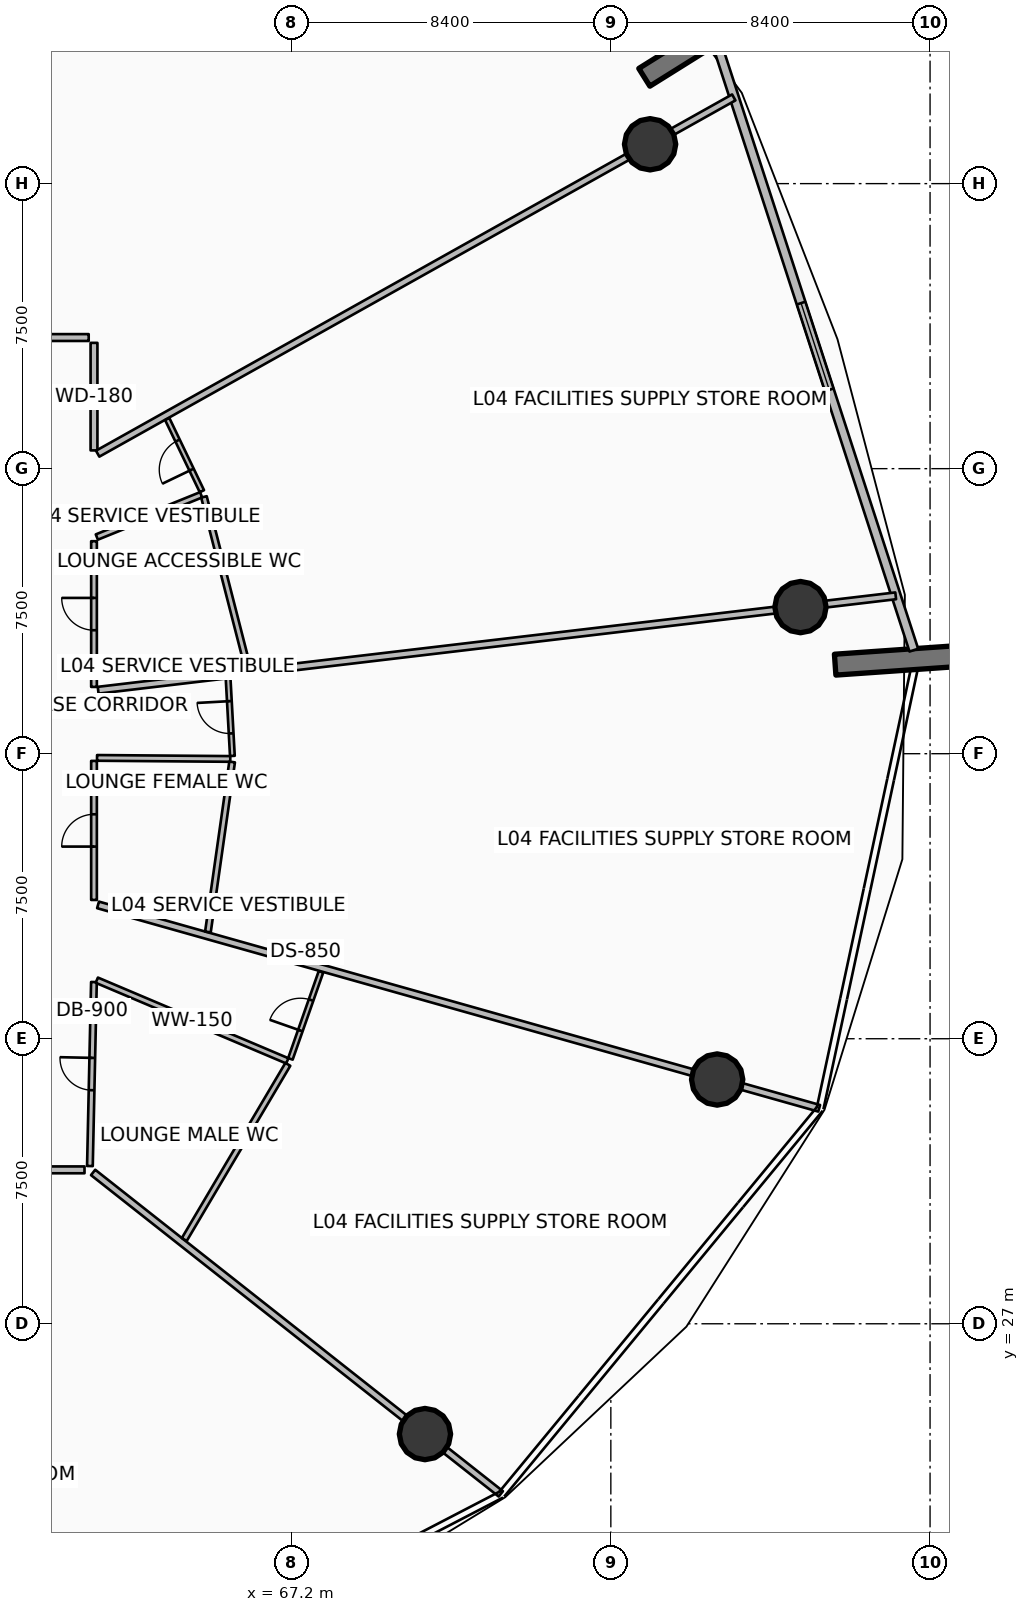
"""IFC4 building model, lengths in metres.
Left out: names, types, materials, properties, quantities, classifications, styles, units other than length and angle.
Written with IfcOpenShell. Run it as: python <this file> out.ifc"""

import sys

from ifc_helpers import new_model, si_unit, direction, frame, frame_2d, origin, origin_2d, place, context, subcontext, project, spatial, rectangle, circle, extrude, element, fill, save


model = new_model("IFC4")
c1 = context("Model", 3, precision=1e-05, world=origin(), true_north=direction((0.0, 1.0)))
c2 = subcontext(c1, "Body", "Model", "MODEL_VIEW")
j1 = project(units=[si_unit("LENGTHUNIT", "METRE"), si_unit("PLANEANGLEUNIT", "RADIAN")], contexts=[c1])
p1 = place(None, origin())
s1 = spatial("IfcSite", under=j1, at=p1, CompositionType="ELEMENT")
p2 = place(p1, origin())
s2 = spatial("IfcBuilding", under=s1, at=p2, CompositionType="ELEMENT")
p3 = place(p2, frame((0.0, 0.0, 21.6)))
s3 = spatial("IfcBuildingStorey", under=s2, at=p3, CompositionType="ELEMENT", Elevation=21.6)
for number, where, z_axis, x_axis in (
    (1, (76.481, 59.797, 0.0), (0.0, 0.0, 1.0), (0.848, 0.53, 0.0)),
    (2, (81.503, 44.343, 0.0), (0.0, 0.0, 1.0), (0.998, 0.07, 0.0)),
):
    element("IfcWall", number, at=place(p3, frame(where, z_axis=z_axis, x_axis=x_axis)), inside=s3, PredefinedType="SOLIDWALL", context=c2, shape_type="SweptSolid", body=[
        extrude(rectangle(XDim=3.5, YDim=0.55, at=frame_2d((1.75, 0.0))), origin(), (0.0, 0.0, 1.0), 4.8),
    ])
p4 = place(p3, frame((76.633, 58.035, 0.0), z_axis=(-0.515579191141, -0.288765528915, 0.806717154257), x_axis=(0.488656419967, -0.872476305251, 0.0)))
e3 = element("IfcColumn", 3, at=p4, inside=s3, PredefinedType="COLUMN", context=c2, shape_type="SweptSolid", body=[
    extrude(circle(Radius=0.675, at=origin_2d()), origin(), (0.0, 0.0, 1.0), 5.454),
])
p5 = place(p3, frame((60.889, 18.984, 0.0), z_axis=(-0.247961982584, 0.442707288227, 0.861698968401), x_axis=(-0.872467449304, -0.488672231568, 0.0)))
e4 = element("IfcColumn", 4, at=p5, inside=s3, PredefinedType="COLUMN", context=c2, shape_type="SweptSolid", body=[
    extrude(circle(Radius=0.675, at=origin_2d()), origin(), (0.0, 0.0, 1.0), 5.106),
])
p6 = place(p3, frame((70.709, 24.098, 0.0), z_axis=(-0.425909043598, 0.335748350699, 0.840163395766), x_axis=(-0.619081137709, -0.785327030563, 0.0)))
e5 = element("IfcColumn", 5, at=p6, inside=s3, PredefinedType="COLUMN", context=c2, shape_type="SweptSolid", body=[
    extrude(circle(Radius=0.675, at=origin_2d()), origin(), (0.0, 0.0, 1.0), 5.237),
])
p7 = place(p3, frame((78.398, 33.427, 0.0), z_axis=(-0.554552366056, 0.156415694351, 0.817316220237), x_axis=(-0.271465773361, -0.96244809413, 0.0)))
e6 = element("IfcColumn", 6, at=p7, inside=s3, PredefinedType="COLUMN", context=c2, shape_type="SweptSolid", body=[
    extrude(circle(Radius=0.675, at=origin_2d()), origin(), (0.0, 0.0, 1.0), 5.383),
])
p8 = place(p3, frame((80.59, 45.857, 0.0), z_axis=(-0.586842932978, -0.069427413352, 0.806718790093), x_axis=(0.117487290092, -0.993074386271, 0.0)))
e7 = element("IfcColumn", 7, at=p8, inside=s3, PredefinedType="COLUMN", context=c2, shape_type="SweptSolid", body=[
    extrude(circle(Radius=0.675, at=origin_2d()), origin(), (0.0, 0.0, 1.0), 5.454),
])
p9 = place(p3, frame((83.573, 44.725, 0.0), z_axis=(0.0, 0.0, 1.0), x_axis=(-0.309022005354, 0.951054888115, 0.0)))
e8 = element("IfcWall", 8, at=p9, inside=s3, PredefinedType="SOLIDWALL", context=c2, shape_type="SweptSolid", body=[
    extrude(rectangle(XDim=16.803, YDim=0.24, at=frame_2d((8.401, 0.0))), origin(), (0.0, 0.0, 1.0), 3.35),
])
p10 = place(p9, frame((7.201, 0.0, 0.85)))
e9 = element("IfcOpeningElement", 9, at=p10, cuts=e8, PredefinedType="OPENING", context=c2, shape_type="SweptSolid", body=[
    extrude(rectangle(XDim=2.4, YDim=2.1, at=frame_2d((1.2, 1.05))), frame((0.0, 0.13, 0.0), z_axis=(0.0, -1.0, 0.0), x_axis=(1.0, 0.0, 0.0)), (0.0, 0.0, 1.0), 0.26),
])
p11 = place(p3, frame((62.0, 49.98, 0.0), z_axis=(0.0, 0.0, 1.0), x_axis=(0.0, 1.0, 0.0)))
e10 = element("IfcWall", 10, at=p11, inside=s3, PredefinedType="PARTITIONING", context=c2, shape_type="SweptSolid", body=[
    extrude(rectangle(XDim=2.83, YDim=0.18, at=frame_2d((1.415, 0.0))), origin(), (0.0, 0.0, 1.0), 3.357),
])
p12 = place(p3, frame((61.86, 52.95, 0.0), z_axis=(0.0, 0.0, 1.0), x_axis=(-1.0, 0.0, 0.0)))
e11 = element("IfcWall", 11, at=p12, inside=s3, PredefinedType="PARTITIONING", context=c2, shape_type="SweptSolid", body=[
    extrude(rectangle(XDim=5.088, YDim=0.18, at=frame_2d((2.544, 0.0))), origin(), (0.0, 0.0, 1.0), 3.357),
])
p13 = place(p3, frame((62.096, 49.894, 0.0), z_axis=(0.0, 0.0, 1.0), x_axis=(0.872490608205, 0.488630881744, 0.0)))
e12 = element("IfcWall", 12, at=p13, inside=s3, PredefinedType="PARTITIONING", context=c2, shape_type="SweptSolid", body=[
    extrude(rectangle(XDim=19.185, YDim=0.18, at=frame_2d((9.592, 0.0))), origin(), (0.0, 0.0, 1.0), 3.357),
])
p14 = place(p3, frame((54.272, 31.05, 0.0), z_axis=(0.0, 0.0, 1.0), x_axis=(1.0, 0.0, 0.0)))
e13 = element("IfcWall", 13, at=p14, inside=s3, PredefinedType="PARTITIONING", context=c2, shape_type="SweptSolid", body=[
    extrude(rectangle(XDim=7.478, YDim=0.18, at=frame_2d((3.739, 0.0))), origin(), (0.0, 0.0, 1.0), 3.357),
])
p15 = place(p14, frame((3.214, 0.0, 0.0)))
e14 = element("IfcOpeningElement", 14, at=p15, cuts=e13, PredefinedType="OPENING", context=c2, shape_type="SweptSolid", body=[
    extrude(rectangle(XDim=1.05, YDim=2.1, at=frame_2d((0.525, 1.05))), frame((0.0, 0.1, 0.0), z_axis=(0.0, -1.0, 0.0), x_axis=(1.0, 0.0, 0.0)), (0.0, 0.0, 1.0), 0.2),
])
p16 = place(p3, frame((61.976, 30.982, 0.0), z_axis=(0.0, 0.0, 1.0), x_axis=(0.785315783489, -0.619095404766, 0.0)))
e15 = element("IfcWall", 15, at=p16, inside=s3, PredefinedType="PARTITIONING", context=c2, shape_type="SweptSolid", body=[
    extrude(rectangle(XDim=13.661, YDim=0.18, at=frame_2d((6.831, 0.0))), origin(), (0.0, 0.0, 1.0), 3.357),
])
p17 = place(p3, frame((61.892, 31.15, 0.0), z_axis=(0.0, 0.0, 1.0), x_axis=(0.021928973177, 0.999759531155, 0.0)))
e16 = element("IfcWall", 16, at=p17, inside=s3, PredefinedType="PARTITIONING", context=c2, shape_type="SweptSolid", body=[
    extrude(rectangle(XDim=4.843, YDim=0.15, at=frame_2d((2.421, 0.0))), origin(), (0.0, 0.0, 1.0), 3.357),
])
p18 = place(p17, frame((1.997, 0.0, 0.0)))
e17 = element("IfcOpeningElement", 17, at=p18, cuts=e16, PredefinedType="OPENING", context=c2, shape_type="SweptSolid", body=[
    extrude(rectangle(XDim=0.85, YDim=2.06, at=frame_2d((0.425, 1.03))), frame((0.0, 0.085, 0.0), z_axis=(0.0, -1.0, 0.0), x_axis=(1.0, 0.0, 0.0)), (0.0, 0.0, 1.0), 0.17),
])
p19 = place(p3, frame((62.074, 36.041, 0.0), z_axis=(0.0, 0.0, 1.0), x_axis=(0.920841540816, -0.38993699069, 0.0)))
e18 = element("IfcWall", 18, at=p19, inside=s3, PredefinedType="PARTITIONING", context=c2, shape_type="SweptSolid", body=[
    extrude(rectangle(XDim=5.443, YDim=0.15, at=frame_2d((2.722, 0.0))), origin(), (0.0, 0.0, 1.0), 3.84),
])
p20 = place(p3, frame((64.375, 29.217, 0.0), z_axis=(0.0, 0.0, 1.0), x_axis=(0.509047270842, 0.860738564286, 0.0)))
e19 = element("IfcWall", 19, at=p20, inside=s3, PredefinedType="PARTITIONING", context=c2, shape_type="SweptSolid", body=[
    extrude(rectangle(XDim=5.354, YDim=0.15, at=frame_2d((2.677, 0.0))), origin(), (0.0, 0.0, 1.0), 3.357),
])
p21 = place(p3, frame((67.168, 33.97, 0.0), z_axis=(0.0, 0.0, 1.0), x_axis=(0.331316814656, 0.943519564358, 0.0)))
e20 = element("IfcWall", 20, at=p21, inside=s3, PredefinedType="PARTITIONING", context=c2, shape_type="SweptSolid", body=[
    extrude(rectangle(XDim=2.43, YDim=0.125, at=frame_2d((1.215, 0.0))), origin(), (0.0, 0.0, 1.0), 3.357),
])
p22 = place(p21, frame((0.79, 0.0, 0.0)))
e21 = element("IfcOpeningElement", 21, at=p22, cuts=e20, PredefinedType="OPENING", context=c2, shape_type="SweptSolid", body=[
    extrude(rectangle(XDim=0.85, YDim=2.06, at=frame_2d((0.425, 1.03))), frame((0.0, 0.073, 0.0), z_axis=(0.0, -1.0, 0.0), x_axis=(1.0, 0.0, 0.0)), (0.0, 0.0, 1.0), 0.145),
])
p23 = place(p3, frame((62.106, 38.022, 0.0), z_axis=(0.0, 0.0, 1.0), x_axis=(0.962455233657, -0.271440459782, 0.0)))
e22 = element("IfcWall", 22, at=p23, inside=s3, PredefinedType="PARTITIONING", context=c2, shape_type="SweptSolid", body=[
    extrude(rectangle(XDim=19.716, YDim=0.18, at=frame_2d((9.858, 0.0))), origin(), (0.0, 0.0, 1.0), 3.357),
])
p24 = place(p3, frame((62.0, 38.152, 0.0), z_axis=(0.0, 0.0, 1.0), x_axis=(0.0, 1.0, 0.0)))
e23 = element("IfcWall", 23, at=p24, inside=s3, PredefinedType="PARTITIONING", context=c2, shape_type="SweptSolid", body=[
    extrude(rectangle(XDim=3.658, YDim=0.15, at=frame_2d((1.829, 0.0))), origin(), (0.0, 0.0, 1.0), 3.357),
])
p25 = place(p24, frame((1.404, 0.0, 0.0)))
e24 = element("IfcOpeningElement", 24, at=p25, cuts=e23, PredefinedType="OPENING", context=c2, shape_type="SweptSolid", body=[
    extrude(rectangle(XDim=0.85, YDim=2.06, at=frame_2d((0.425, 1.03))), frame((0.0, 0.085, 0.0), z_axis=(0.0, -1.0, 0.0), x_axis=(1.0, 0.0, 0.0)), (0.0, 0.0, 1.0), 0.17),
])
p26 = place(p3, frame((62.08, 41.889, 0.0), z_axis=(0.0, 0.0, 1.0), x_axis=(0.999969031596, -0.007869933178, 0.0)))
e25 = element("IfcWall", 25, at=p26, inside=s3, PredefinedType="PARTITIONING", context=c2, shape_type="SweptSolid", body=[
    extrude(rectangle(XDim=3.505, YDim=0.15, at=frame_2d((1.753, 0.0))), origin(), (0.0, 0.0, 1.0), 3.84),
])
p27 = place(p3, frame((64.998, 37.309, 0.0), z_axis=(0.0, 0.0, 1.0), x_axis=(0.140922059176, 0.990020693338, 0.0)))
e26 = element("IfcWall", 26, at=p27, inside=s3, PredefinedType="PARTITIONING", context=c2, shape_type="SweptSolid", body=[
    extrude(rectangle(XDim=4.518, YDim=0.15, at=frame_2d((2.259, 0.0))), origin(), (0.0, 0.0, 1.0), 3.357),
])
p28 = place(p3, frame((65.641, 41.941, 0.0), z_axis=(0.0, 0.0, 1.0), x_axis=(-0.054918793983, 0.998490824228, 0.0)))
e27 = element("IfcWall", 27, at=p28, inside=s3, PredefinedType="PARTITIONING", context=c2, shape_type="SweptSolid", body=[
    extrude(rectangle(XDim=2.036, YDim=0.125, at=frame_2d((1.018, 0.0))), origin(), (0.0, 0.0, 1.0), 3.357),
])
p29 = place(p28, frame((0.593, 0.0, 0.0)))
e28 = element("IfcOpeningElement", 28, at=p29, cuts=e27, PredefinedType="OPENING", context=c2, shape_type="SweptSolid", body=[
    extrude(rectangle(XDim=0.85, YDim=2.06, at=frame_2d((0.425, 1.03))), frame((0.0, 0.073, 0.0), z_axis=(0.0, -1.0, 0.0), x_axis=(1.0, 0.0, 0.0)), (0.0, 0.0, 1.0), 0.145),
])
p30 = place(p3, frame((62.109, 43.67, 0.0), z_axis=(0.0, 0.0, 1.0), x_axis=(0.993068665713, 0.117535633659, 0.0)))
e29 = element("IfcWall", 29, at=p30, inside=s3, PredefinedType="PARTITIONING", context=c2, shape_type="SweptSolid", body=[
    extrude(rectangle(XDim=21.133, YDim=0.18, at=frame_2d((10.566, 0.0))), origin(), (0.0, 0.0, 1.0), 3.357),
])
p31 = place(p3, frame((62.0, 43.757, 0.0), z_axis=(0.0, 0.0, 1.0), x_axis=(0.0, 1.0, 0.0)))
e30 = element("IfcWall", 30, at=p31, inside=s3, PredefinedType="PARTITIONING", context=c2, shape_type="SweptSolid", body=[
    extrude(rectangle(XDim=3.833, YDim=0.15, at=frame_2d((1.917, 0.0))), origin(), (0.0, 0.0, 1.0), 3.357),
])
p32 = place(p31, frame((1.492, 0.0, 0.0)))
e31 = element("IfcOpeningElement", 31, at=p32, cuts=e30, PredefinedType="OPENING", context=c2, shape_type="SweptSolid", body=[
    extrude(rectangle(XDim=0.85, YDim=2.06, at=frame_2d((0.425, 1.03))), frame((0.0, 0.085, 0.0), z_axis=(0.0, -1.0, 0.0), x_axis=(1.0, 0.0, 0.0)), (0.0, 0.0, 1.0), 0.17),
])
p33 = place(p3, frame((62.074, 47.701, 0.0), z_axis=(0.0, 0.0, 1.0), x_axis=(0.926852538468, 0.375425587747, 0.0)))
e32 = element("IfcWall", 32, at=p33, inside=s3, PredefinedType="PARTITIONING", context=c2, shape_type="SweptSolid", body=[
    extrude(rectangle(XDim=2.96, YDim=0.15, at=frame_2d((1.48, 0.0))), origin(), (0.0, 0.0, 1.0), 3.84),
])
p34 = place(p3, frame((66.054, 44.237, 0.0), z_axis=(0.0, 0.0, 1.0), x_axis=(-0.248710144761, 0.968577959636, 0.0)))
e33 = element("IfcWall", 33, at=p34, inside=s3, PredefinedType="PARTITIONING", context=c2, shape_type="SweptSolid", body=[
    extrude(rectangle(XDim=4.667, YDim=0.15, at=frame_2d((2.333, 0.0))), origin(), (0.0, 0.0, 1.0), 3.357),
])
p35 = place(p3, frame((64.839, 48.906, 0.0), z_axis=(0.0, 0.0, 1.0), x_axis=(-0.432923235959, 0.901430791446, 0.0)))
e34 = element("IfcWall", 34, at=p35, inside=s3, PredefinedType="PARTITIONING", context=c2, shape_type="SweptSolid", body=[
    extrude(rectangle(XDim=2.106, YDim=0.125, at=frame_2d((1.053, 0.0))), origin(), (0.0, 0.0, 1.0), 3.357),
])
p36 = place(p35, frame((0.628, 0.0, 0.0)))
e35 = element("IfcOpeningElement", 35, at=p36, cuts=e34, PredefinedType="OPENING", context=c2, shape_type="SweptSolid", body=[
    extrude(rectangle(XDim=0.85, YDim=2.06, at=frame_2d((0.425, 1.03))), frame((0.0, 0.073, 0.0), z_axis=(0.0, -1.0, 0.0), x_axis=(1.0, 0.0, 0.0)), (0.0, 0.0, 1.0), 0.145),
])
p37 = place(p10, origin())
e36 = element("IfcWindow", 36, at=p37, inside=s3, PartitioningType="SINGLE_PANEL", PredefinedType="WINDOW", context=c2, shape_type="SweptSolid", body=[
    extrude(rectangle(XDim=2.4, YDim=2.1, at=frame_2d((1.2, 1.05))), frame((0.0, 0.03, 0.0), z_axis=(0.0, -1.0, 0.0), x_axis=(1.0, 0.0, 0.0)), (0.0, 0.0, 1.0), 0.06),
])
fill(e9, e36)
p38 = place(p18, origin())
e37 = element("IfcDoor", 37, at=p38, inside=s3, OperationType="SINGLE_SWING_RIGHT", PredefinedType="DOOR", context=c2, shape_type="SweptSolid", body=[
    extrude(rectangle(XDim=0.85, YDim=2.06, at=frame_2d((0.425, 1.03))), frame((0.0, 0.025, 0.0), z_axis=(0.0, -1.0, 0.0), x_axis=(1.0, 0.0, 0.0)), (0.0, 0.0, 1.0), 0.05),
])
fill(e17, e37)
p39 = place(p22, origin())
e38 = element("IfcDoor", 38, at=p39, inside=s3, OperationType="SINGLE_SWING_LEFT", PredefinedType="DOOR", context=c2, shape_type="SweptSolid", body=[
    extrude(rectangle(XDim=0.85, YDim=2.06, at=frame_2d((0.425, 1.03))), frame((0.0, 0.025, 0.0), z_axis=(0.0, -1.0, 0.0), x_axis=(1.0, 0.0, 0.0)), (0.0, 0.0, 1.0), 0.05),
])
fill(e21, e38)
p40 = place(p25, origin())
e39 = element("IfcDoor", 39, at=p40, inside=s3, OperationType="SINGLE_SWING_LEFT", PredefinedType="DOOR", context=c2, shape_type="SweptSolid", body=[
    extrude(rectangle(XDim=0.85, YDim=2.06, at=frame_2d((0.425, 1.03))), frame((0.0, 0.025, 0.0), z_axis=(0.0, -1.0, 0.0), x_axis=(1.0, 0.0, 0.0)), (0.0, 0.0, 1.0), 0.05),
])
fill(e24, e39)
p41 = place(p29, origin())
e40 = element("IfcDoor", 40, at=p41, inside=s3, OperationType="SINGLE_SWING_RIGHT", PredefinedType="DOOR", context=c2, shape_type="SweptSolid", body=[
    extrude(rectangle(XDim=0.85, YDim=2.06, at=frame_2d((0.425, 1.03))), frame((0.0, 0.025, 0.0), z_axis=(0.0, -1.0, 0.0), x_axis=(1.0, 0.0, 0.0)), (0.0, 0.0, 1.0), 0.05),
])
fill(e28, e40)
p42 = place(p32, origin())
e41 = element("IfcDoor", 41, at=p42, inside=s3, OperationType="SINGLE_SWING_RIGHT", PredefinedType="DOOR", context=c2, shape_type="SweptSolid", body=[
    extrude(rectangle(XDim=0.85, YDim=2.06, at=frame_2d((0.425, 1.03))), frame((0.0, 0.025, 0.0), z_axis=(0.0, -1.0, 0.0), x_axis=(1.0, 0.0, 0.0)), (0.0, 0.0, 1.0), 0.05),
])
fill(e31, e41)
p43 = place(p36, origin())
e42 = element("IfcDoor", 42, at=p43, inside=s3, OperationType="SINGLE_SWING_LEFT", PredefinedType="DOOR", context=c2, shape_type="SweptSolid", body=[
    extrude(rectangle(XDim=0.85, YDim=2.06, at=frame_2d((0.425, 1.03))), frame((0.0, 0.025, 0.0), z_axis=(0.0, -1.0, 0.0), x_axis=(1.0, 0.0, 0.0)), (0.0, 0.0, 1.0), 0.05),
])
fill(e35, e42)
save(model, sys.argv[1])
